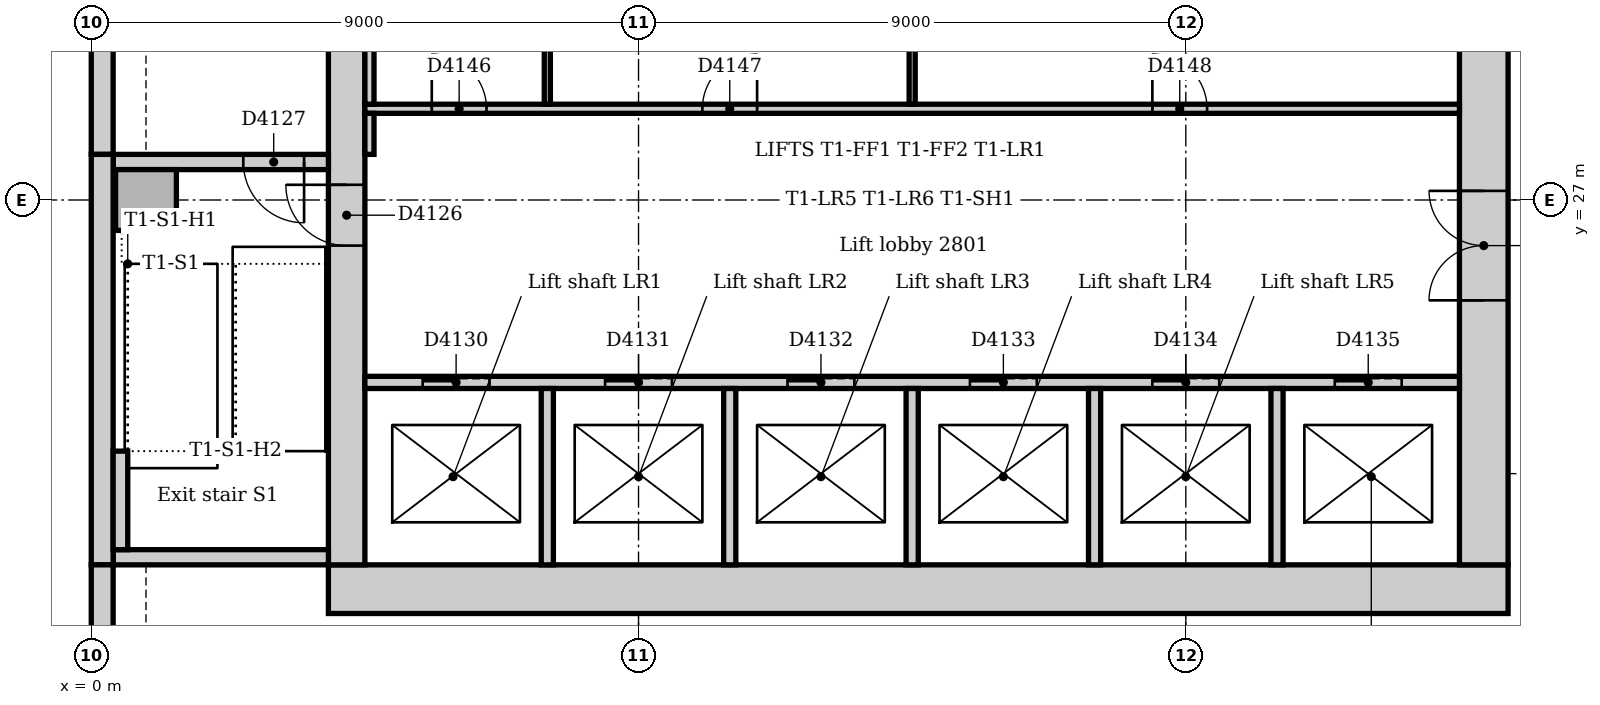
"""IFC4 building model, lengths in metres.
Left out: names, types, materials, properties, quantities, classifications, styles, units other than length and angle.
Written with IfcOpenShell. Run it as: python <this file> out.ifc"""

import sys

from ifc_helpers import new_model, si_unit, direction, frame, frame_2d, origin, origin_2d, place, context, subcontext, project, spatial, rectangle, extrude, element, fill, save


model = new_model("IFC4")
c1 = context("Model", 3, precision=1e-05, world=origin(), true_north=direction((0.0, 1.0)))
c2 = subcontext(c1, "Body", "Model", "MODEL_VIEW")
j1 = project(units=[si_unit("LENGTHUNIT", "METRE"), si_unit("PLANEANGLEUNIT", "RADIAN")], contexts=[c1])
p1 = place(None, origin())
s1 = spatial("IfcSite", under=j1, at=p1, CompositionType="ELEMENT")
p2 = place(p1, origin())
s2 = spatial("IfcBuilding", under=s1, at=p2, CompositionType="ELEMENT")
p3 = place(p2, frame((0.0, 0.0, 120.0)))
s3 = spatial("IfcBuildingStorey", under=s2, at=p3, CompositionType="ELEMENT", Elevation=120.0)
p4 = place(p3, frame((3.9, 20.6, 0.0), z_axis=(0.0, 0.0, 1.0), x_axis=(1.0, 0.0, 0.0)))
e1 = element("IfcWall", 1, at=p4, inside=s3, PredefinedType="SOLIDWALL", context=c2, shape_type="SweptSolid", body=[
    extrude(rectangle(XDim=19.4, YDim=0.8, at=frame_2d((9.7, 0.0))), origin(), (0.0, 0.0, 1.0), 4.0),
])
p5 = place(p3, frame((22.9, 21.0, 0.0), z_axis=(0.0, 0.0, 1.0), x_axis=(0.0, 1.0, 0.0)))
e2 = element("IfcWall", 2, at=p5, inside=s3, PredefinedType="SOLIDWALL", context=c2, shape_type="SweptSolid", body=[
    extrude(rectangle(XDim=10.5, YDim=0.8, at=frame_2d((5.25, 0.0))), origin(), (0.0, 0.0, 1.0), 4.0),
])
p6 = place(p5, frame((4.35, 0.0, 0.0)))
e3 = element("IfcOpeningElement", 3, at=p6, cuts=e2, PredefinedType="OPENING", context=c2, shape_type="SweptSolid", body=[
    extrude(rectangle(XDim=1.8, YDim=2.1, at=frame_2d((0.9, 1.05))), frame((0.0, 0.41, 0.0), z_axis=(0.0, -1.0, 0.0), x_axis=(1.0, 0.0, 0.0)), (0.0, 0.0, 1.0), 0.82),
])
p7 = place(p3, frame((4.2, 31.5, 0.0), z_axis=(0.0, 0.0, 1.0), x_axis=(0.0, -1.0, 0.0)))
e4 = element("IfcWall", 4, at=p7, inside=s3, PredefinedType="SOLIDWALL", context=c2, shape_type="SweptSolid", body=[
    extrude(rectangle(XDim=10.5, YDim=0.6, at=frame_2d((5.25, 0.0))), origin(), (0.0, 0.0, 1.0), 4.0),
])
p8 = place(p7, frame((4.25, 0.0, 0.0)))
e5 = element("IfcOpeningElement", 5, at=p8, cuts=e4, PredefinedType="OPENING", context=c2, shape_type="SweptSolid", body=[
    extrude(rectangle(XDim=1.0, YDim=2.1, at=frame_2d((0.5, 1.05))), frame((0.0, 0.31, 0.0), z_axis=(0.0, -1.0, 0.0), x_axis=(1.0, 0.0, 0.0)), (0.0, 0.0, 1.0), 0.62),
])
p9 = place(p3, frame((0.36, 21.125, 0.0), z_axis=(0.0, 0.0, 1.0), x_axis=(1.0, 0.0, 0.0)))
e6 = element("IfcWall", 6, at=p9, inside=s3, PredefinedType="SOLIDWALL", context=c2, shape_type="SweptSolid", body=[
    extrude(rectangle(XDim=3.54, YDim=0.25, at=frame_2d((1.77, 0.0))), origin(), (0.0, 0.0, 1.0), 4.0),
])
p10 = place(p3, frame((3.9, 27.625, 0.0), z_axis=(0.0, 0.0, 1.0), x_axis=(-1.0, 0.0, 0.0)))
e7 = element("IfcWall", 7, at=p10, inside=s3, PredefinedType="SOLIDWALL", context=c2, shape_type="SweptSolid", body=[
    extrude(rectangle(XDim=3.54, YDim=0.25, at=frame_2d((1.77, 0.0))), origin(), (0.0, 0.0, 1.0), 4.0),
])
p11 = place(p10, frame((0.4, 0.0, 0.0)))
e8 = element("IfcOpeningElement", 8, at=p11, cuts=e7, PredefinedType="OPENING", context=c2, shape_type="SweptSolid", body=[
    extrude(rectangle(XDim=1.0, YDim=2.1, at=frame_2d((0.5, 1.05))), frame((0.0, 0.135, 0.0), z_axis=(0.0, -1.0, 0.0), x_axis=(1.0, 0.0, 0.0)), (0.0, 0.0, 1.0), 0.27),
])
p12 = place(p3, frame((0.9, 27.0, 0.0), z_axis=(0.0, 0.0, 1.0), x_axis=(1.0, 0.0, 0.0)))
e9 = element("IfcColumn", 9, at=p12, inside=s3, PredefinedType="COLUMN", context=c2, shape_type="SweptSolid", body=[
    extrude(rectangle(XDim=1.0, YDim=1.0, at=origin_2d()), origin(), (0.0, 0.0, 1.0), 4.0),
])
p13 = place(p3, frame((0.18, 35.25, 0.0), z_axis=(0.0, 0.0, 1.0), x_axis=(0.0, -1.0, 0.0)))
e10 = element("IfcWall", 10, at=p13, inside=s3, PredefinedType="STANDARD", context=c2, shape_type="SweptSolid", body=[
    extrude(rectangle(XDim=7.5, YDim=0.36, at=frame_2d((3.75, 0.0))), origin(), (0.0, 0.0, 1.0), 3.85),
])
p14 = place(p3, frame((0.18, 27.75, 0.0), z_axis=(0.0, 0.0, 1.0), x_axis=(0.0, -1.0, 0.0)))
e11 = element("IfcWall", 11, at=p14, inside=s3, PredefinedType="STANDARD", context=c2, shape_type="SweptSolid", body=[
    extrude(rectangle(XDim=6.75, YDim=0.36, at=frame_2d((3.375, 0.0))), origin(), (0.0, 0.0, 1.0), 3.85),
])
p15 = place(p3, frame((0.18, 21.0, 0.0), z_axis=(0.0, 0.0, 1.0), x_axis=(0.0, -1.0, 0.0)))
e12 = element("IfcWall", 12, at=p15, inside=s3, PredefinedType="STANDARD", context=c2, shape_type="SweptSolid", body=[
    extrude(rectangle(XDim=12.257, YDim=0.36, at=frame_2d((6.129, 0.0))), origin(), (0.0, 0.0, 1.0), 3.85),
])
p16 = place(p15, frame((1.35, 0.0, 0.9)))
e13 = element("IfcOpeningElement", 13, at=p16, cuts=e12, PredefinedType="OPENING", context=c2, shape_type="SweptSolid", body=[
    extrude(rectangle(XDim=3.3, YDim=1.6, at=frame_2d((1.65, 0.8))), frame((0.0, 0.19, 0.0), z_axis=(0.0, -1.0, 0.0), x_axis=(1.0, 0.0, 0.0)), (0.0, 0.0, 1.0), 0.38),
])
p17 = place(p15, frame((6.15, 0.0, 0.9)))
e14 = element("IfcOpeningElement", 14, at=p17, cuts=e12, PredefinedType="OPENING", context=c2, shape_type="SweptSolid", body=[
    extrude(rectangle(XDim=3.3, YDim=1.6, at=frame_2d((1.65, 0.8))), frame((0.0, 0.19, 0.0), z_axis=(0.0, -1.0, 0.0), x_axis=(1.0, 0.0, 0.0)), (0.0, 0.0, 1.0), 0.38),
])
p18 = place(p3, frame((0.48, 21.25, 0.0), z_axis=(0.0, 0.0, 1.0), x_axis=(0.0, 1.0, 0.0)))
e15 = element("IfcWall", 15, at=p18, inside=s3, PredefinedType="STANDARD", context=c2, shape_type="SweptSolid", body=[
    extrude(rectangle(XDim=1.62, YDim=0.24, at=frame_2d((0.81, 0.0))), origin(), (0.0, 0.0, 1.0), 4.0),
])
p19 = place(p3, frame((4.5, 24.0, 0.0), z_axis=(0.0, 0.0, 1.0), x_axis=(1.0, 0.0, 0.0)))
e16 = element("IfcWall", 16, at=p19, inside=s3, PredefinedType="PARTITIONING", context=c2, shape_type="SweptSolid", body=[
    extrude(rectangle(XDim=18.0, YDim=0.2, at=frame_2d((9.0, 0.0))), origin(), (0.0, 0.0, 1.0), 3.85),
])
p20 = place(p19, frame((0.95, 0.0, 0.0)))
e17 = element("IfcOpeningElement", 17, at=p20, cuts=e16, PredefinedType="OPENING", context=c2, shape_type="SweptSolid", body=[
    extrude(rectangle(XDim=1.1, YDim=2.1, at=frame_2d((0.55, 1.05))), frame((0.0, 0.11, 0.0), z_axis=(0.0, -1.0, 0.0), x_axis=(1.0, 0.0, 0.0)), (0.0, 0.0, 1.0), 0.22),
])
p21 = place(p19, frame((3.95, 0.0, 0.0)))
e18 = element("IfcOpeningElement", 18, at=p21, cuts=e16, PredefinedType="OPENING", context=c2, shape_type="SweptSolid", body=[
    extrude(rectangle(XDim=1.1, YDim=2.1, at=frame_2d((0.55, 1.05))), frame((0.0, 0.11, 0.0), z_axis=(0.0, -1.0, 0.0), x_axis=(1.0, 0.0, 0.0)), (0.0, 0.0, 1.0), 0.22),
])
p22 = place(p19, frame((6.95, 0.0, 0.0)))
e19 = element("IfcOpeningElement", 19, at=p22, cuts=e16, PredefinedType="OPENING", context=c2, shape_type="SweptSolid", body=[
    extrude(rectangle(XDim=1.1, YDim=2.1, at=frame_2d((0.55, 1.05))), frame((0.0, 0.11, 0.0), z_axis=(0.0, -1.0, 0.0), x_axis=(1.0, 0.0, 0.0)), (0.0, 0.0, 1.0), 0.22),
])
p23 = place(p19, frame((9.95, 0.0, 0.0)))
e20 = element("IfcOpeningElement", 20, at=p23, cuts=e16, PredefinedType="OPENING", context=c2, shape_type="SweptSolid", body=[
    extrude(rectangle(XDim=1.1, YDim=2.1, at=frame_2d((0.55, 1.05))), frame((0.0, 0.11, 0.0), z_axis=(0.0, -1.0, 0.0), x_axis=(1.0, 0.0, 0.0)), (0.0, 0.0, 1.0), 0.22),
])
p24 = place(p19, frame((12.95, 0.0, 0.0)))
e21 = element("IfcOpeningElement", 21, at=p24, cuts=e16, PredefinedType="OPENING", context=c2, shape_type="SweptSolid", body=[
    extrude(rectangle(XDim=1.1, YDim=2.1, at=frame_2d((0.55, 1.05))), frame((0.0, 0.11, 0.0), z_axis=(0.0, -1.0, 0.0), x_axis=(1.0, 0.0, 0.0)), (0.0, 0.0, 1.0), 0.22),
])
p25 = place(p19, frame((15.95, 0.0, 0.0)))
e22 = element("IfcOpeningElement", 22, at=p25, cuts=e16, PredefinedType="OPENING", context=c2, shape_type="SweptSolid", body=[
    extrude(rectangle(XDim=1.1, YDim=2.1, at=frame_2d((0.55, 1.05))), frame((0.0, 0.11, 0.0), z_axis=(0.0, -1.0, 0.0), x_axis=(1.0, 0.0, 0.0)), (0.0, 0.0, 1.0), 0.22),
])
for number, where, z_axis, x_axis in (
    (23, (7.5, 21.0, 0.0), (0.0, 0.0, 1.0), (0.0, 1.0, 0.0)),
    (24, (10.5, 21.0, 0.0), (0.0, 0.0, 1.0), (0.0, 1.0, 0.0)),
    (25, (13.5, 21.0, 0.0), (0.0, 0.0, 1.0), (0.0, 1.0, 0.0)),
    (26, (16.5, 21.0, 0.0), (0.0, 0.0, 1.0), (0.0, 1.0, 0.0)),
    (27, (19.5, 21.0, 0.0), (0.0, 0.0, 1.0), (0.0, 1.0, 0.0)),
):
    element("IfcWall", number, at=place(p3, frame(where, z_axis=z_axis, x_axis=x_axis)), inside=s3, PredefinedType="PARTITIONING", context=c2, shape_type="SweptSolid", body=[
        extrude(rectangle(XDim=2.9, YDim=0.2, at=frame_2d((1.45, 0.0))), origin(), (0.0, 0.0, 1.0), 3.85),
    ])
p26 = place(p3, frame((4.5, 28.5, 0.0), z_axis=(0.0, 0.0, 1.0), x_axis=(1.0, 0.0, 0.0)))
e28 = element("IfcWall", 28, at=p26, inside=s3, PredefinedType="PARTITIONING", context=c2, shape_type="SweptSolid", body=[
    extrude(rectangle(XDim=18.0, YDim=0.15, at=frame_2d((9.0, 0.0))), origin(), (0.0, 0.0, 1.0), 3.85),
])
p27 = place(p26, frame((1.1, 0.0, 0.0)))
e29 = element("IfcOpeningElement", 29, at=p27, cuts=e28, PredefinedType="OPENING", context=c2, shape_type="SweptSolid", body=[
    extrude(rectangle(XDim=0.9, YDim=2.1, at=frame_2d((0.45, 1.05))), frame((0.0, 0.085, 0.0), z_axis=(0.0, -1.0, 0.0), x_axis=(1.0, 0.0, 0.0)), (0.0, 0.0, 1.0), 0.17),
])
p28 = place(p26, frame((5.55, 0.0, 0.0)))
e30 = element("IfcOpeningElement", 30, at=p28, cuts=e28, PredefinedType="OPENING", context=c2, shape_type="SweptSolid", body=[
    extrude(rectangle(XDim=0.9, YDim=2.1, at=frame_2d((0.45, 1.05))), frame((0.0, 0.085, 0.0), z_axis=(0.0, -1.0, 0.0), x_axis=(1.0, 0.0, 0.0)), (0.0, 0.0, 1.0), 0.17),
])
p29 = place(p26, frame((12.95, 0.0, 0.0)))
e31 = element("IfcOpeningElement", 31, at=p29, cuts=e28, PredefinedType="OPENING", context=c2, shape_type="SweptSolid", body=[
    extrude(rectangle(XDim=0.9, YDim=2.1, at=frame_2d((0.45, 1.05))), frame((0.0, 0.085, 0.0), z_axis=(0.0, -1.0, 0.0), x_axis=(1.0, 0.0, 0.0)), (0.0, 0.0, 1.0), 0.17),
])
p30 = place(p3, frame((4.575, 27.75, 0.0), z_axis=(0.0, 0.0, 1.0), x_axis=(0.0, 1.0, 0.0)))
e32 = element("IfcWall", 32, at=p30, inside=s3, PredefinedType="PARTITIONING", context=c2, shape_type="SweptSolid", body=[
    extrude(rectangle(XDim=0.675, YDim=0.15, at=frame_2d((0.338, 0.0))), origin(), (0.0, 0.0, 1.0), 3.85),
])
p31 = place(p3, frame((4.575, 28.575, 0.0), z_axis=(0.0, 0.0, 1.0), x_axis=(0.0, 1.0, 0.0)))
e33 = element("IfcWall", 33, at=p31, inside=s3, PredefinedType="PARTITIONING", context=c2, shape_type="SweptSolid", body=[
    extrude(rectangle(XDim=2.675, YDim=0.15, at=frame_2d((1.337, 0.0))), origin(), (0.0, 0.0, 1.0), 3.85),
])
for number, where, z_axis, x_axis in (
    (34, (7.5, 28.575, 0.0), (0.0, 0.0, 1.0), (0.0, 1.0, 0.0)),
    (35, (13.5, 28.575, 0.0), (0.0, 0.0, 1.0), (0.0, 1.0, 0.0)),
):
    element("IfcWall", number, at=place(p3, frame(where, z_axis=z_axis, x_axis=x_axis)), inside=s3, PredefinedType="PARTITIONING", context=c2, shape_type="SweptSolid", body=[
        extrude(rectangle(XDim=2.675, YDim=0.1, at=frame_2d((1.337, 0.0))), origin(), (0.0, 0.0, 1.0), 3.85),
    ])
p32 = place(p8, frame((1.0, 0.0, 0.0), z_axis=(0.0, 0.0, 1.0), x_axis=(-1.0, 0.0, 0.0)))
e36 = element("IfcDoor", 36, at=p32, inside=s3, OperationType="SINGLE_SWING_RIGHT", PredefinedType="DOOR", context=c2, shape_type="SweptSolid", body=[
    extrude(rectangle(XDim=1.0, YDim=2.1, at=frame_2d((0.5, 1.05))), frame((0.0, 0.025, 0.0), z_axis=(0.0, -1.0, 0.0), x_axis=(1.0, 0.0, 0.0)), (0.0, 0.0, 1.0), 0.05),
])
fill(e5, e36)
p33 = place(p11, origin())
e37 = element("IfcDoor", 37, at=p33, inside=s3, OperationType="SINGLE_SWING_LEFT", PredefinedType="DOOR", context=c2, shape_type="SweptSolid", body=[
    extrude(rectangle(XDim=1.0, YDim=2.1, at=frame_2d((0.5, 1.05))), frame((0.0, 0.025, 0.0), z_axis=(0.0, -1.0, 0.0), x_axis=(1.0, 0.0, 0.0)), (0.0, 0.0, 1.0), 0.05),
])
fill(e8, e37)
p34 = place(p20, origin())
e38 = element("IfcDoor", 38, at=p34, inside=s3, OperationType="SLIDING_TO_LEFT", PredefinedType="DOOR", context=c2, shape_type="SweptSolid", body=[
    extrude(rectangle(XDim=1.1, YDim=2.1, at=frame_2d((0.55, 1.05))), frame((0.0, 0.025, 0.0), z_axis=(0.0, -1.0, 0.0), x_axis=(1.0, 0.0, 0.0)), (0.0, 0.0, 1.0), 0.05),
])
fill(e17, e38)
p35 = place(p21, origin())
e39 = element("IfcDoor", 39, at=p35, inside=s3, OperationType="SLIDING_TO_LEFT", PredefinedType="DOOR", context=c2, shape_type="SweptSolid", body=[
    extrude(rectangle(XDim=1.1, YDim=2.1, at=frame_2d((0.55, 1.05))), frame((0.0, 0.025, 0.0), z_axis=(0.0, -1.0, 0.0), x_axis=(1.0, 0.0, 0.0)), (0.0, 0.0, 1.0), 0.05),
])
fill(e18, e39)
p36 = place(p22, origin())
e40 = element("IfcDoor", 40, at=p36, inside=s3, OperationType="SLIDING_TO_LEFT", PredefinedType="DOOR", context=c2, shape_type="SweptSolid", body=[
    extrude(rectangle(XDim=1.1, YDim=2.1, at=frame_2d((0.55, 1.05))), frame((0.0, 0.025, 0.0), z_axis=(0.0, -1.0, 0.0), x_axis=(1.0, 0.0, 0.0)), (0.0, 0.0, 1.0), 0.05),
])
fill(e19, e40)
p37 = place(p23, origin())
e41 = element("IfcDoor", 41, at=p37, inside=s3, OperationType="SLIDING_TO_LEFT", PredefinedType="DOOR", context=c2, shape_type="SweptSolid", body=[
    extrude(rectangle(XDim=1.1, YDim=2.1, at=frame_2d((0.55, 1.05))), frame((0.0, 0.025, 0.0), z_axis=(0.0, -1.0, 0.0), x_axis=(1.0, 0.0, 0.0)), (0.0, 0.0, 1.0), 0.05),
])
fill(e20, e41)
p38 = place(p24, origin())
e42 = element("IfcDoor", 42, at=p38, inside=s3, OperationType="SLIDING_TO_LEFT", PredefinedType="DOOR", context=c2, shape_type="SweptSolid", body=[
    extrude(rectangle(XDim=1.1, YDim=2.1, at=frame_2d((0.55, 1.05))), frame((0.0, 0.025, 0.0), z_axis=(0.0, -1.0, 0.0), x_axis=(1.0, 0.0, 0.0)), (0.0, 0.0, 1.0), 0.05),
])
fill(e21, e42)
p39 = place(p25, origin())
e43 = element("IfcDoor", 43, at=p39, inside=s3, OperationType="SLIDING_TO_LEFT", PredefinedType="DOOR", context=c2, shape_type="SweptSolid", body=[
    extrude(rectangle(XDim=1.1, YDim=2.1, at=frame_2d((0.55, 1.05))), frame((0.0, 0.025, 0.0), z_axis=(0.0, -1.0, 0.0), x_axis=(1.0, 0.0, 0.0)), (0.0, 0.0, 1.0), 0.05),
])
fill(e22, e43)
p40 = place(p6, origin())
e44 = element("IfcDoor", 44, at=p40, inside=s3, OperationType="DOUBLE_DOOR_DOUBLE_SWING", PredefinedType="DOOR", context=c2, shape_type="SweptSolid", body=[
    extrude(rectangle(XDim=1.8, YDim=2.1, at=frame_2d((0.9, 1.05))), frame((0.0, 0.025, 0.0), z_axis=(0.0, -1.0, 0.0), x_axis=(1.0, 0.0, 0.0)), (0.0, 0.0, 1.0), 0.05),
])
fill(e3, e44)
p41 = place(p27, origin())
e45 = element("IfcDoor", 45, at=p41, inside=s3, OperationType="SINGLE_SWING_LEFT", PredefinedType="DOOR", context=c2, shape_type="SweptSolid", body=[
    extrude(rectangle(XDim=0.9, YDim=2.1, at=frame_2d((0.45, 1.05))), frame((0.0, 0.025, 0.0), z_axis=(0.0, -1.0, 0.0), x_axis=(1.0, 0.0, 0.0)), (0.0, 0.0, 1.0), 0.05),
])
fill(e29, e45)
p42 = place(p28, origin())
e46 = element("IfcDoor", 46, at=p42, inside=s3, OperationType="SINGLE_SWING_RIGHT", PredefinedType="DOOR", context=c2, shape_type="SweptSolid", body=[
    extrude(rectangle(XDim=0.9, YDim=2.1, at=frame_2d((0.45, 1.05))), frame((0.0, 0.025, 0.0), z_axis=(0.0, -1.0, 0.0), x_axis=(1.0, 0.0, 0.0)), (0.0, 0.0, 1.0), 0.05),
])
fill(e30, e46)
p43 = place(p29, origin())
e47 = element("IfcDoor", 47, at=p43, inside=s3, OperationType="SINGLE_SWING_LEFT", PredefinedType="DOOR", context=c2, shape_type="SweptSolid", body=[
    extrude(rectangle(XDim=0.9, YDim=2.1, at=frame_2d((0.45, 1.05))), frame((0.0, 0.025, 0.0), z_axis=(0.0, -1.0, 0.0), x_axis=(1.0, 0.0, 0.0)), (0.0, 0.0, 1.0), 0.05),
])
fill(e31, e47)
save(model, sys.argv[1])
